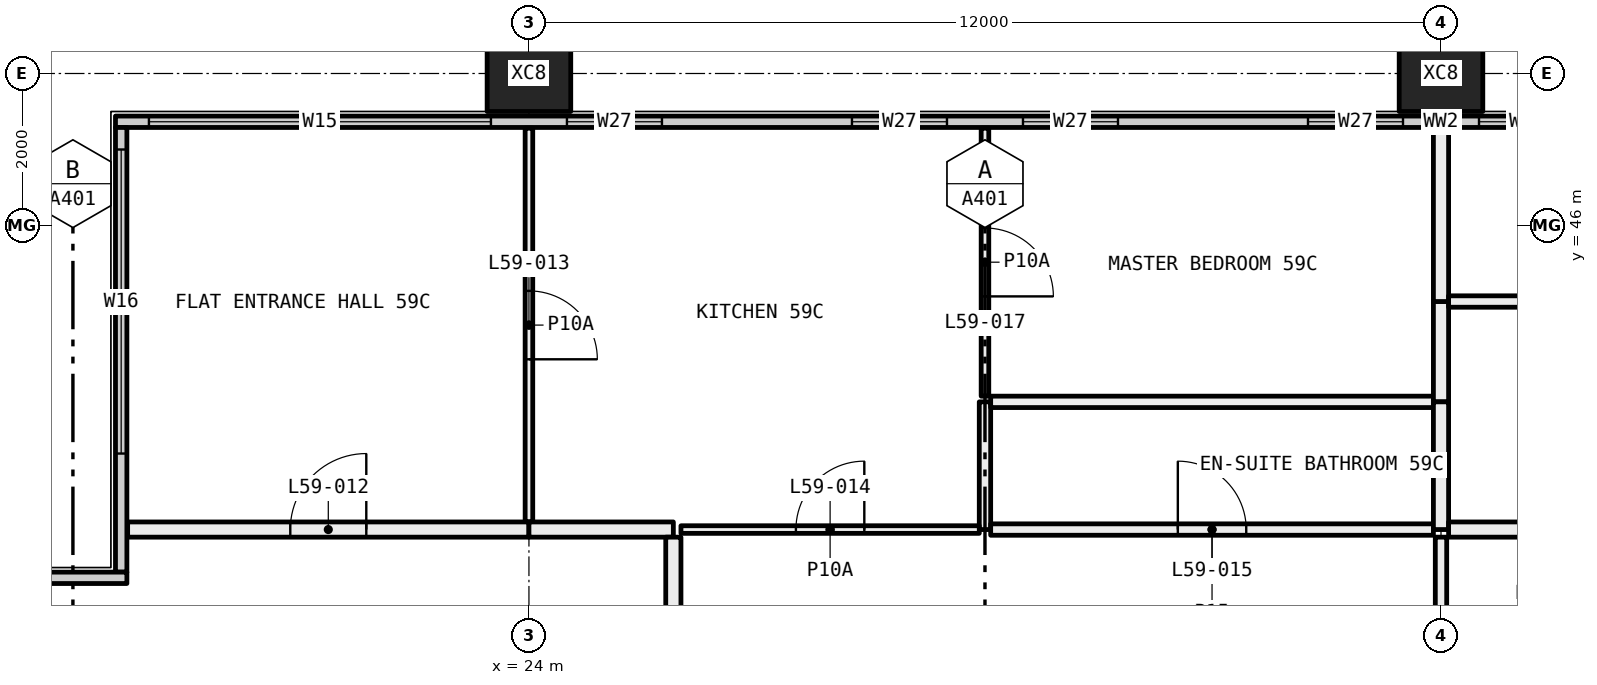
"""IFC4 building model, lengths in metres.
Left out: names, types, materials, properties, quantities, classifications, styles, units other than length and angle.
Written with IfcOpenShell. Run it as: python <this file> out.ifc"""

import sys

from ifc_helpers import new_model, si_unit, direction, frame, frame_2d, origin, origin_2d, place, context, subcontext, project, spatial, rectangle, hollow_rectangle, extrude, element, fill, save


model = new_model("IFC4")
c1 = context("Model", 3, precision=1e-05, world=origin(), true_north=direction((0.0, 1.0)))
c2 = subcontext(c1, "Body", "Model", "MODEL_VIEW")
j1 = project(units=[si_unit("LENGTHUNIT", "METRE"), si_unit("PLANEANGLEUNIT", "RADIAN")], contexts=[c1])
p1 = place(None, origin())
s1 = spatial("IfcSite", under=j1, at=p1, CompositionType="ELEMENT")
p2 = place(p1, origin())
s2 = spatial("IfcBuilding", under=s1, at=p2, CompositionType="ELEMENT")
p3 = place(p2, frame((0.0, 0.0, 221.4)))
s3 = spatial("IfcBuildingStorey", under=s2, at=p3, CompositionType="ELEMENT", Elevation=221.4)
for number, where, z_axis, x_axis in (
    (1, (24.0, 48.0, -0.4), (0.0, 0.0, 1.0), (1.0, 0.0, 0.0)),
    (2, (36.0, 48.0, -0.4), (0.0, 0.0, 1.0), (1.0, 0.0, 0.0)),
):
    element("IfcColumn", number, at=place(p3, frame(where, z_axis=z_axis, x_axis=x_axis)), inside=s3, PredefinedType="COLUMN", context=c2, shape_type="SweptSolid", body=[
        extrude(hollow_rectangle(XDim=1.1, YDim=1.0, WallThickness=0.04, at=origin_2d()), origin(), (0.0, 0.0, 1.0), 3.45),
    ])
p4 = place(p3, frame((18.56, 47.365, 0.0), z_axis=(0.0, 0.0, 1.0), x_axis=(1.0, 0.0, 0.0)))
e3 = element("IfcWall", 3, at=p4, inside=s3, PredefinedType="ELEMENTEDWALL", context=c2, shape_type="SweptSolid", body=[
    extrude(rectangle(XDim=34.88, YDim=0.15, at=frame_2d((17.44, 0.0))), origin(), (0.0, 0.0, 1.0), 3.05),
])
p5 = place(p4, frame((0.44, 0.0, 0.45)))
e4 = element("IfcOpeningElement", 4, at=p5, cuts=e3, PredefinedType="OPENING", context=c2, shape_type="SweptSolid", body=[
    extrude(rectangle(XDim=4.5, YDim=2.55, at=frame_2d((2.25, 1.275))), frame((0.0, 0.085, 0.0), z_axis=(0.0, -1.0, 0.0), x_axis=(1.0, 0.0, 0.0)), (0.0, 0.0, 1.0), 0.17),
])
p6 = place(p4, frame((5.94, 0.0, 0.45)))
e5 = element("IfcOpeningElement", 5, at=p6, cuts=e3, PredefinedType="OPENING", context=c2, shape_type="SweptSolid", body=[
    extrude(rectangle(XDim=1.25, YDim=2.55, at=frame_2d((0.625, 1.275))), frame((0.0, 0.085, 0.0), z_axis=(0.0, -1.0, 0.0), x_axis=(1.0, 0.0, 0.0)), (0.0, 0.0, 1.0), 0.17),
])
p7 = place(p4, frame((9.69, 0.0, 0.45)))
e6 = element("IfcOpeningElement", 6, at=p7, cuts=e3, PredefinedType="OPENING", context=c2, shape_type="SweptSolid", body=[
    extrude(rectangle(XDim=1.25, YDim=2.55, at=frame_2d((0.625, 1.275))), frame((0.0, 0.085, 0.0), z_axis=(0.0, -1.0, 0.0), x_axis=(1.0, 0.0, 0.0)), (0.0, 0.0, 1.0), 0.17),
])
p8 = place(p4, frame((11.94, 0.0, 0.45)))
e7 = element("IfcOpeningElement", 7, at=p8, cuts=e3, PredefinedType="OPENING", context=c2, shape_type="SweptSolid", body=[
    extrude(rectangle(XDim=1.25, YDim=2.55, at=frame_2d((0.625, 1.275))), frame((0.0, 0.085, 0.0), z_axis=(0.0, -1.0, 0.0), x_axis=(1.0, 0.0, 0.0)), (0.0, 0.0, 1.0), 0.17),
])
p9 = place(p4, frame((15.69, 0.0, 0.45)))
e8 = element("IfcOpeningElement", 8, at=p9, cuts=e3, PredefinedType="OPENING", context=c2, shape_type="SweptSolid", body=[
    extrude(rectangle(XDim=1.25, YDim=2.55, at=frame_2d((0.625, 1.275))), frame((0.0, 0.085, 0.0), z_axis=(0.0, -1.0, 0.0), x_axis=(1.0, 0.0, 0.0)), (0.0, 0.0, 1.0), 0.17),
])
p10 = place(p4, frame((17.94, 0.0, 0.45)))
e9 = element("IfcOpeningElement", 9, at=p10, cuts=e3, PredefinedType="OPENING", context=c2, shape_type="SweptSolid", body=[
    extrude(rectangle(XDim=1.25, YDim=2.55, at=frame_2d((0.625, 1.275))), frame((0.0, 0.085, 0.0), z_axis=(0.0, -1.0, 0.0), x_axis=(1.0, 0.0, 0.0)), (0.0, 0.0, 1.0), 0.17),
])
p11 = place(p4, frame((21.69, 0.0, 0.45)))
e10 = element("IfcOpeningElement", 10, at=p11, cuts=e3, PredefinedType="OPENING", context=c2, shape_type="SweptSolid", body=[
    extrude(rectangle(XDim=1.25, YDim=2.55, at=frame_2d((0.625, 1.275))), frame((0.0, 0.085, 0.0), z_axis=(0.0, -1.0, 0.0), x_axis=(1.0, 0.0, 0.0)), (0.0, 0.0, 1.0), 0.17),
])
p12 = place(p4, frame((23.94, 0.0, 0.45)))
e11 = element("IfcOpeningElement", 11, at=p12, cuts=e3, PredefinedType="OPENING", context=c2, shape_type="SweptSolid", body=[
    extrude(rectangle(XDim=1.25, YDim=2.55, at=frame_2d((0.625, 1.275))), frame((0.0, 0.085, 0.0), z_axis=(0.0, -1.0, 0.0), x_axis=(1.0, 0.0, 0.0)), (0.0, 0.0, 1.0), 0.17),
])
p13 = place(p4, frame((27.69, 0.0, 0.45)))
e12 = element("IfcOpeningElement", 12, at=p13, cuts=e3, PredefinedType="OPENING", context=c2, shape_type="SweptSolid", body=[
    extrude(rectangle(XDim=1.25, YDim=2.55, at=frame_2d((0.625, 1.275))), frame((0.0, 0.085, 0.0), z_axis=(0.0, -1.0, 0.0), x_axis=(1.0, 0.0, 0.0)), (0.0, 0.0, 1.0), 0.17),
])
p14 = place(p4, frame((29.94, 0.0, 0.45)))
e13 = element("IfcOpeningElement", 13, at=p14, cuts=e3, PredefinedType="OPENING", context=c2, shape_type="SweptSolid", body=[
    extrude(rectangle(XDim=4.5, YDim=2.55, at=frame_2d((2.25, 1.275))), frame((0.0, 0.085, 0.0), z_axis=(0.0, -1.0, 0.0), x_axis=(1.0, 0.0, 0.0)), (0.0, 0.0, 1.0), 0.17),
])
p15 = place(p3, frame((18.635, 41.44, 0.0), z_axis=(0.0, 0.0, 1.0), x_axis=(0.0, 1.0, 0.0)))
e14 = element("IfcWall", 14, at=p15, inside=s3, PredefinedType="ELEMENTEDWALL", context=c2, shape_type="SweptSolid", body=[
    extrude(rectangle(XDim=5.85, YDim=0.15, at=frame_2d((2.925, 0.0))), origin(), (0.0, 0.0, 1.0), 3.05),
])
p16 = place(p15, frame((1.56, 0.0, 0.45)))
e15 = element("IfcOpeningElement", 15, at=p16, cuts=e14, PredefinedType="OPENING", context=c2, shape_type="SweptSolid", body=[
    extrude(rectangle(XDim=4.0, YDim=2.55, at=frame_2d((2.0, 1.275))), frame((0.0, 0.085, 0.0), z_axis=(0.0, -1.0, 0.0), x_axis=(1.0, 0.0, 0.0)), (0.0, 0.0, 1.0), 0.17),
])
p17 = place(p3, frame((12.56, 41.365, 0.0), z_axis=(0.0, 0.0, 1.0), x_axis=(1.0, 0.0, 0.0)))
e16 = element("IfcWall", 16, at=p17, inside=s3, PredefinedType="ELEMENTEDWALL", context=c2, shape_type="SweptSolid", body=[
    extrude(rectangle(XDim=6.15, YDim=0.15, at=frame_2d((3.075, 0.0))), origin(), (0.0, 0.0, 1.0), 3.05),
])
p18 = place(p17, frame((0.44, 0.0, 0.45)))
e17 = element("IfcOpeningElement", 17, at=p18, cuts=e16, PredefinedType="OPENING", context=c2, shape_type="SweptSolid", body=[
    extrude(rectangle(XDim=4.0, YDim=2.55, at=frame_2d((2.0, 1.275))), frame((0.0, 0.085, 0.0), z_axis=(0.0, -1.0, 0.0), x_axis=(1.0, 0.0, 0.0)), (0.0, 0.0, 1.0), 0.17),
])
p19 = place(p3, frame((24.0, 42.1, 0.0), z_axis=(0.0, 0.0, 1.0), x_axis=(0.0, 1.0, 0.0)))
e18 = element("IfcWall", 18, at=p19, inside=s3, PredefinedType="PARTITIONING", context=c2, shape_type="SweptSolid", body=[
    extrude(rectangle(XDim=5.18, YDim=0.1, at=frame_2d((2.59, 0.0))), origin(), (0.0, 0.0, 1.0), 3.05),
])
p20 = place(p19, frame((2.14, 0.0, 0.0)))
e19 = element("IfcOpeningElement", 19, at=p20, cuts=e18, PredefinedType="OPENING", context=c2, shape_type="SweptSolid", body=[
    extrude(rectangle(XDim=0.9, YDim=2.1, at=frame_2d((0.45, 1.05))), frame((0.0, 0.06, 0.0), z_axis=(0.0, -1.0, 0.0), x_axis=(1.0, 0.0, 0.0)), (0.0, 0.0, 1.0), 0.12),
])
p21 = place(p3, frame((18.72, 42.0, 0.0), z_axis=(0.0, 0.0, 1.0), x_axis=(1.0, 0.0, 0.0)))
e20 = element("IfcWall", 20, at=p21, inside=s3, PredefinedType="PARTITIONING", context=c2, shape_type="SweptSolid", body=[
    extrude(rectangle(XDim=5.28, YDim=0.2, at=frame_2d((2.64, 0.0))), origin(), (0.0, 0.0, 1.0), 3.05),
])
p22 = place(p21, frame((2.14, 0.0, 0.0)))
e21 = element("IfcOpeningElement", 21, at=p22, cuts=e20, PredefinedType="OPENING", context=c2, shape_type="SweptSolid", body=[
    extrude(rectangle(XDim=1.0, YDim=2.1, at=frame_2d((0.5, 1.05))), frame((0.0, 0.11, 0.0), z_axis=(0.0, -1.0, 0.0), x_axis=(1.0, 0.0, 0.0)), (0.0, 0.0, 1.0), 0.22),
])
p23 = place(p3, frame((30.0, 43.755, 0.0), z_axis=(0.0, 0.0, 1.0), x_axis=(0.0, 1.0, 0.0)))
e22 = element("IfcWall", 22, at=p23, inside=s3, PredefinedType="PARTITIONING", context=c2, shape_type="SweptSolid", body=[
    extrude(rectangle(XDim=3.525, YDim=0.1, at=frame_2d((1.763, 0.0))), origin(), (0.0, 0.0, 1.0), 3.05),
])
p24 = place(p23, frame((1.312, 0.0, 0.0)))
e23 = element("IfcOpeningElement", 23, at=p24, cuts=e22, PredefinedType="OPENING", context=c2, shape_type="SweptSolid", body=[
    extrude(rectangle(XDim=0.9, YDim=2.1, at=frame_2d((0.45, 1.05))), frame((0.0, 0.06, 0.0), z_axis=(0.0, -1.0, 0.0), x_axis=(1.0, 0.0, 0.0)), (0.0, 0.0, 1.0), 0.12),
])
p25 = place(p3, frame((30.0, 42.0, 0.0), z_axis=(0.0, 0.0, 1.0), x_axis=(0.0, 1.0, 0.0)))
e24 = element("IfcWall", 24, at=p25, inside=s3, PredefinedType="PARTITIONING", context=c2, shape_type="SweptSolid", body=[
    extrude(rectangle(XDim=1.68, YDim=0.15, at=frame_2d((0.84, 0.0))), origin(), (0.0, 0.0, 1.0), 3.05),
])
p26 = place(p3, frame((26.0, 42.0, 0.0), z_axis=(0.0, 0.0, 1.0), x_axis=(1.0, 0.0, 0.0)))
e25 = element("IfcWall", 25, at=p26, inside=s3, PredefinedType="PARTITIONING", context=c2, shape_type="SweptSolid", body=[
    extrude(rectangle(XDim=3.925, YDim=0.1, at=frame_2d((1.962, 0.0))), origin(), (0.0, 0.0, 1.0), 3.05),
])
p27 = place(p26, frame((1.512, 0.0, 0.0)))
e26 = element("IfcOpeningElement", 26, at=p27, cuts=e25, PredefinedType="OPENING", context=c2, shape_type="SweptSolid", body=[
    extrude(rectangle(XDim=0.9, YDim=2.1, at=frame_2d((0.45, 1.05))), frame((0.0, 0.06, 0.0), z_axis=(0.0, -1.0, 0.0), x_axis=(1.0, 0.0, 0.0)), (0.0, 0.0, 1.0), 0.12),
])
p28 = place(p3, frame((24.0, 42.0, 0.0), z_axis=(0.0, 0.0, 1.0), x_axis=(1.0, 0.0, 0.0)))
e27 = element("IfcWall", 27, at=p28, inside=s3, PredefinedType="PARTITIONING", context=c2, shape_type="SweptSolid", body=[
    extrude(rectangle(XDim=1.9, YDim=0.2, at=frame_2d((0.95, 0.0))), origin(), (0.0, 0.0, 1.0), 3.05),
])
p29 = place(p3, frame((30.075, 43.68, 0.0), z_axis=(0.0, 0.0, 1.0), x_axis=(1.0, 0.0, 0.0)))
e28 = element("IfcWall", 28, at=p29, inside=s3, PredefinedType="PARTITIONING", context=c2, shape_type="SweptSolid", body=[
    extrude(rectangle(XDim=5.825, YDim=0.15, at=frame_2d((2.913, 0.0))), origin(), (0.0, 0.0, 1.0), 3.05),
])
p30 = place(p3, frame((36.0, 43.68, 0.0), z_axis=(0.0, 0.0, 1.0), x_axis=(0.0, 1.0, 0.0)))
e29 = element("IfcWall", 29, at=p30, inside=s3, PredefinedType="PARTITIONING", context=c2, shape_type="SweptSolid", body=[
    extrude(rectangle(XDim=1.32, YDim=0.2, at=frame_2d((0.66, 0.0))), origin(), (0.0, 0.0, 1.0), 2.45),
])
p31 = place(p3, frame((36.0, 45.0, 0.0), z_axis=(0.0, 0.0, 1.0), x_axis=(0.0, 1.0, 0.0)))
e30 = element("IfcWall", 30, at=p31, inside=s3, PredefinedType="PARTITIONING", context=c2, shape_type="SweptSolid", body=[
    extrude(rectangle(XDim=2.28, YDim=0.2, at=frame_2d((1.14, 0.0))), origin(), (0.0, 0.0, 1.0), 2.45),
])
p32 = place(p3, frame((30.075, 42.0, 0.0), z_axis=(0.0, 0.0, 1.0), x_axis=(1.0, 0.0, 0.0)))
e31 = element("IfcWall", 31, at=p32, inside=s3, PredefinedType="PARTITIONING", context=c2, shape_type="SweptSolid", body=[
    extrude(rectangle(XDim=5.825, YDim=0.15, at=frame_2d((2.913, 0.0))), origin(), (0.0, 0.0, 1.0), 3.05),
])
p33 = place(p32, frame((2.462, 0.0, 0.0)))
e32 = element("IfcOpeningElement", 32, at=p33, cuts=e31, PredefinedType="OPENING", context=c2, shape_type="SweptSolid", body=[
    extrude(rectangle(XDim=0.9, YDim=2.1, at=frame_2d((0.45, 1.05))), frame((0.0, 0.085, 0.0), z_axis=(0.0, -1.0, 0.0), x_axis=(1.0, 0.0, 0.0)), (0.0, 0.0, 1.0), 0.17),
])
p34 = place(p3, frame((36.0, 42.0, 0.0), z_axis=(0.0, 0.0, 1.0), x_axis=(0.0, 1.0, 0.0)))
e33 = element("IfcWall", 33, at=p34, inside=s3, PredefinedType="PARTITIONING", context=c2, shape_type="SweptSolid", body=[
    extrude(rectangle(XDim=1.68, YDim=0.2, at=frame_2d((0.84, 0.0))), origin(), (0.0, 0.0, 1.0), 2.45),
])
p35 = place(p3, frame((36.0, 38.25, 0.0), z_axis=(0.0, 0.0, 1.0), x_axis=(0.0, 1.0, 0.0)))
e34 = element("IfcWall", 34, at=p35, inside=s3, PredefinedType="PARTITIONING", context=c2, shape_type="SweptSolid", body=[
    extrude(rectangle(XDim=3.65, YDim=0.15, at=frame_2d((1.825, 0.0))), origin(), (0.0, 0.0, 1.0), 2.45),
])
p36 = place(p35, frame((1.375, 0.0, 0.0)))
e35 = element("IfcOpeningElement", 35, at=p36, cuts=e34, PredefinedType="OPENING", context=c2, shape_type="SweptSolid", body=[
    extrude(rectangle(XDim=0.9, YDim=2.1, at=frame_2d((0.45, 1.05))), frame((0.0, 0.085, 0.0), z_axis=(0.0, -1.0, 0.0), x_axis=(1.0, 0.0, 0.0)), (0.0, 0.0, 1.0), 0.17),
])
p37 = place(p3, frame((25.9, 41.9, 0.0), z_axis=(0.0, 0.0, 1.0), x_axis=(0.0, -1.0, 0.0)))
e36 = element("IfcWall", 36, at=p37, inside=s3, PredefinedType="PARTITIONING", context=c2, shape_type="SweptSolid", body=[
    extrude(rectangle(XDim=5.9, YDim=0.2, at=frame_2d((2.95, 0.0))), origin(), (0.0, 0.0, 1.0), 2.45),
])
p38 = place(p3, frame((38.4, 42.0, 0.0), z_axis=(0.0, 0.0, 1.0), x_axis=(-1.0, 0.0, 0.0)))
e37 = element("IfcWall", 37, at=p38, inside=s3, PredefinedType="PARTITIONING", context=c2, shape_type="SweptSolid", body=[
    extrude(rectangle(XDim=2.3, YDim=0.2, at=frame_2d((1.15, 0.0))), origin(), (0.0, 0.0, 1.0), 3.05),
])
p39 = place(p3, frame((42.0, 45.0, 0.0), z_axis=(0.0, 0.0, 1.0), x_axis=(-1.0, 0.0, 0.0)))
e38 = element("IfcWall", 38, at=p39, inside=s3, PredefinedType="PARTITIONING", context=c2, shape_type="SweptSolid", body=[
    extrude(rectangle(XDim=5.9, YDim=0.15, at=frame_2d((2.95, 0.0))), origin(), (0.0, 0.0, 1.0), 3.05),
])
p40 = place(p5, origin())
e39 = element("IfcWindow", 39, at=p40, inside=s3, PartitioningType="SINGLE_PANEL", PredefinedType="WINDOW", context=c2, shape_type="SweptSolid", body=[
    extrude(rectangle(XDim=4.5, YDim=2.55, at=frame_2d((2.25, 1.275))), frame((0.0, 0.03, 0.0), z_axis=(0.0, -1.0, 0.0), x_axis=(1.0, 0.0, 0.0)), (0.0, 0.0, 1.0), 0.06),
])
fill(e4, e39)
p41 = place(p6, origin())
e40 = element("IfcWindow", 40, at=p41, inside=s3, PartitioningType="SINGLE_PANEL", PredefinedType="WINDOW", context=c2, shape_type="SweptSolid", body=[
    extrude(rectangle(XDim=1.25, YDim=2.55, at=frame_2d((0.625, 1.275))), frame((0.0, 0.03, 0.0), z_axis=(0.0, -1.0, 0.0), x_axis=(1.0, 0.0, 0.0)), (0.0, 0.0, 1.0), 0.06),
])
fill(e5, e40)
p42 = place(p7, origin())
e41 = element("IfcWindow", 41, at=p42, inside=s3, PartitioningType="SINGLE_PANEL", PredefinedType="WINDOW", context=c2, shape_type="SweptSolid", body=[
    extrude(rectangle(XDim=1.25, YDim=2.55, at=frame_2d((0.625, 1.275))), frame((0.0, 0.03, 0.0), z_axis=(0.0, -1.0, 0.0), x_axis=(1.0, 0.0, 0.0)), (0.0, 0.0, 1.0), 0.06),
])
fill(e6, e41)
p43 = place(p8, origin())
e42 = element("IfcWindow", 42, at=p43, inside=s3, PartitioningType="SINGLE_PANEL", PredefinedType="WINDOW", context=c2, shape_type="SweptSolid", body=[
    extrude(rectangle(XDim=1.25, YDim=2.55, at=frame_2d((0.625, 1.275))), frame((0.0, 0.03, 0.0), z_axis=(0.0, -1.0, 0.0), x_axis=(1.0, 0.0, 0.0)), (0.0, 0.0, 1.0), 0.06),
])
fill(e7, e42)
p44 = place(p9, origin())
e43 = element("IfcWindow", 43, at=p44, inside=s3, PartitioningType="SINGLE_PANEL", PredefinedType="WINDOW", context=c2, shape_type="SweptSolid", body=[
    extrude(rectangle(XDim=1.25, YDim=2.55, at=frame_2d((0.625, 1.275))), frame((0.0, 0.03, 0.0), z_axis=(0.0, -1.0, 0.0), x_axis=(1.0, 0.0, 0.0)), (0.0, 0.0, 1.0), 0.06),
])
fill(e8, e43)
p45 = place(p10, origin())
e44 = element("IfcWindow", 44, at=p45, inside=s3, PartitioningType="SINGLE_PANEL", PredefinedType="WINDOW", context=c2, shape_type="SweptSolid", body=[
    extrude(rectangle(XDim=1.25, YDim=2.55, at=frame_2d((0.625, 1.275))), frame((0.0, 0.03, 0.0), z_axis=(0.0, -1.0, 0.0), x_axis=(1.0, 0.0, 0.0)), (0.0, 0.0, 1.0), 0.06),
])
fill(e9, e44)
p46 = place(p16, origin())
e45 = element("IfcWindow", 45, at=p46, inside=s3, PartitioningType="SINGLE_PANEL", PredefinedType="WINDOW", context=c2, shape_type="SweptSolid", body=[
    extrude(rectangle(XDim=4.0, YDim=2.55, at=frame_2d((2.0, 1.275))), frame((0.0, 0.03, 0.0), z_axis=(0.0, -1.0, 0.0), x_axis=(1.0, 0.0, 0.0)), (0.0, 0.0, 1.0), 0.06),
])
fill(e15, e45)
p47 = place(p22, origin())
e46 = element("IfcDoor", 46, at=p47, inside=s3, OperationType="SINGLE_SWING_LEFT", PredefinedType="DOOR", context=c2, shape_type="SweptSolid", body=[
    extrude(rectangle(XDim=1.0, YDim=2.1, at=frame_2d((0.5, 1.05))), frame((0.0, 0.025, 0.0), z_axis=(0.0, -1.0, 0.0), x_axis=(1.0, 0.0, 0.0)), (0.0, 0.0, 1.0), 0.05),
])
fill(e21, e46)
p48 = place(p20, frame((0.9, 0.0, 0.0), x_axis=(-1.0, 0.0, 0.0)))
e47 = element("IfcDoor", 47, at=p48, inside=s3, OperationType="SINGLE_SWING_LEFT", PredefinedType="DOOR", context=c2, shape_type="SweptSolid", body=[
    extrude(rectangle(XDim=0.9, YDim=2.1, at=frame_2d((0.45, 1.05))), frame((0.0, 0.025, 0.0), z_axis=(0.0, -1.0, 0.0), x_axis=(1.0, 0.0, 0.0)), (0.0, 0.0, 1.0), 0.05),
])
fill(e19, e47)
p49 = place(p27, origin())
e48 = element("IfcDoor", 48, at=p49, inside=s3, OperationType="SINGLE_SWING_LEFT", PredefinedType="DOOR", context=c2, shape_type="SweptSolid", body=[
    extrude(rectangle(XDim=0.9, YDim=2.1, at=frame_2d((0.45, 1.05))), frame((0.0, 0.025, 0.0), z_axis=(0.0, -1.0, 0.0), x_axis=(1.0, 0.0, 0.0)), (0.0, 0.0, 1.0), 0.05),
])
fill(e26, e48)
p50 = place(p33, origin())
e49 = element("IfcDoor", 49, at=p50, inside=s3, OperationType="SINGLE_SWING_RIGHT", PredefinedType="DOOR", context=c2, shape_type="SweptSolid", body=[
    extrude(rectangle(XDim=0.9, YDim=2.1, at=frame_2d((0.45, 1.05))), frame((0.0, 0.025, 0.0), z_axis=(0.0, -1.0, 0.0), x_axis=(1.0, 0.0, 0.0)), (0.0, 0.0, 1.0), 0.05),
])
fill(e32, e49)
p51 = place(p24, frame((0.9, 0.0, 0.0), x_axis=(-1.0, 0.0, 0.0)))
e50 = element("IfcDoor", 50, at=p51, inside=s3, OperationType="SINGLE_SWING_LEFT", PredefinedType="DOOR", context=c2, shape_type="SweptSolid", body=[
    extrude(rectangle(XDim=0.9, YDim=2.1, at=frame_2d((0.45, 1.05))), frame((0.0, 0.025, 0.0), z_axis=(0.0, -1.0, 0.0), x_axis=(1.0, 0.0, 0.0)), (0.0, 0.0, 1.0), 0.05),
])
fill(e23, e50)
save(model, sys.argv[1])
